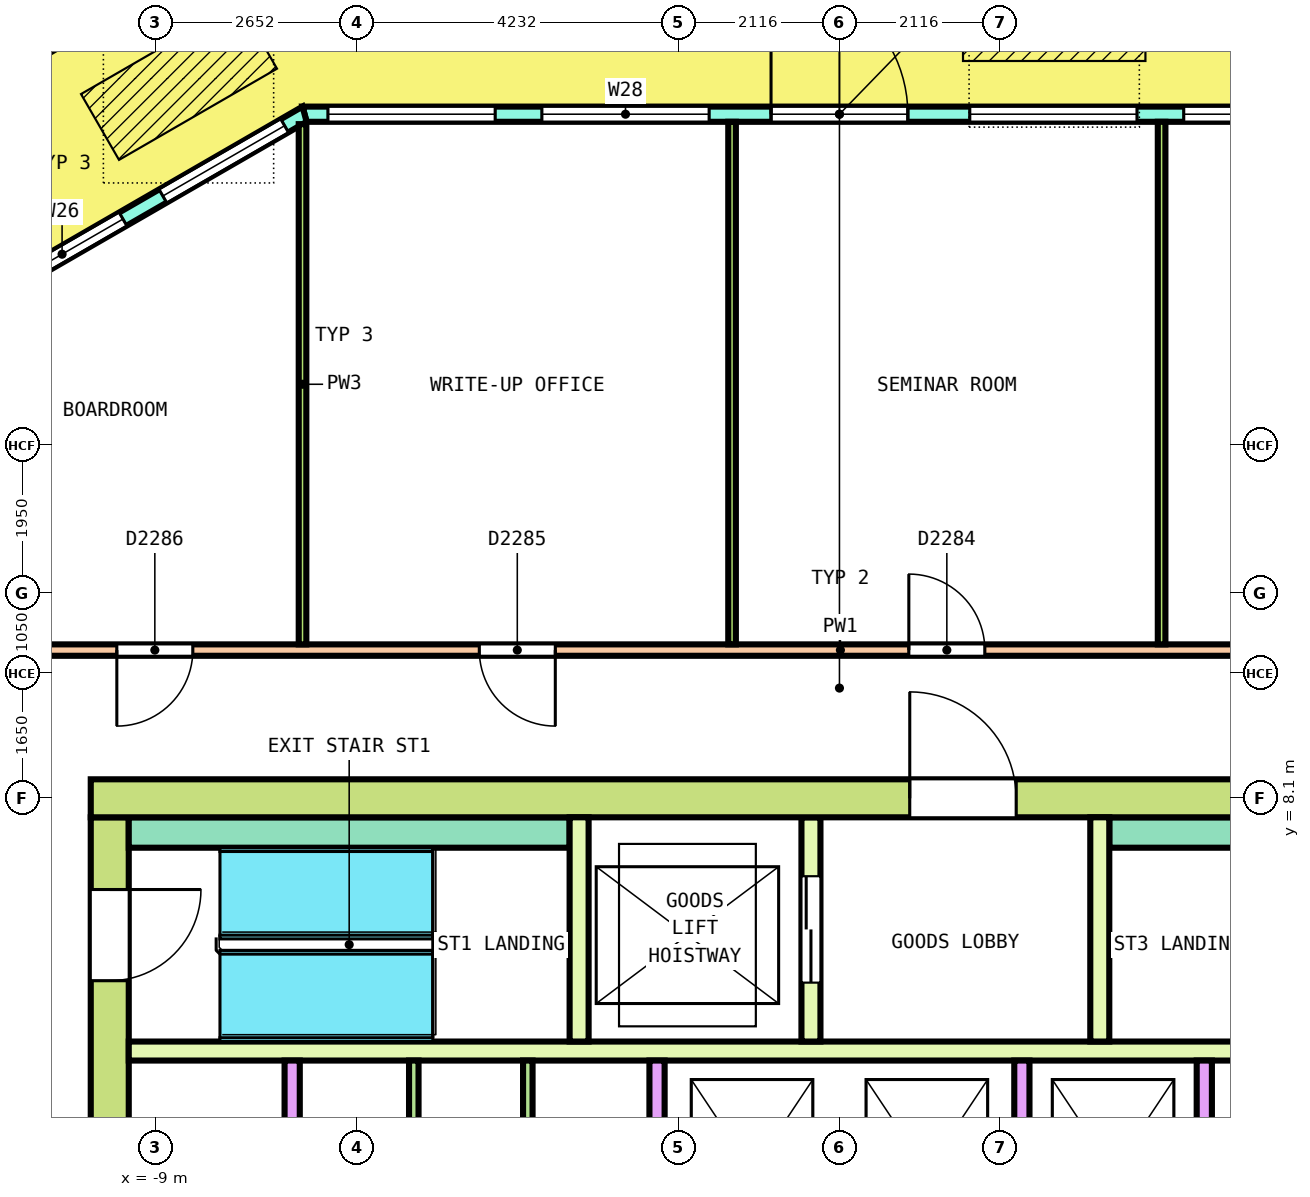
"""IFC4 building model, lengths in metres.
Left out: names, types, materials, properties, quantities, classifications, styles, units other than length and angle.
Written with IfcOpenShell. Run it as: python <this file> out.ifc"""

import sys

from ifc_helpers import new_model, si_unit, direction, frame, frame_2d, origin, origin_2d, place, context, subcontext, project, spatial, polyline, rectangle, outline, extrude, element, fill, save


model = new_model("IFC4")
c1 = context("Model", 3, precision=1e-05, world=origin(), true_north=direction((0.0, 1.0)))
c2 = subcontext(c1, "Body", "Model", "MODEL_VIEW")
j1 = project(units=[si_unit("LENGTHUNIT", "METRE"), si_unit("PLANEANGLEUNIT", "RADIAN")], contexts=[c1])
p1 = place(None, origin())
s1 = spatial("IfcSite", under=j1, at=p1, CompositionType="ELEMENT")
p2 = place(p1, origin())
s2 = spatial("IfcBuilding", under=s1, at=p2, CompositionType="ELEMENT")
p3 = place(p2, frame((0.0, 0.0, 308.6)))
s3 = spatial("IfcBuildingStorey", under=s2, at=p3, CompositionType="ELEMENT", Elevation=308.6)
p4 = place(p3, frame((-10.564, 18.297, 0.0), z_axis=(-0.036297136169, 0.0, 0.99934104184), x_axis=(-0.865312543657, -0.500246354177, -0.031429077673)))
e1 = element("IfcColumn", 1, at=p4, inside=s3, PredefinedType="COLUMN", context=c2, shape_type="SweptSolid", body=[
    extrude(rectangle(XDim=0.85, YDim=0.85, at=origin_2d()), origin(), (0.0, 0.0, 1.0), 3.652),
])
p5 = place(p3, frame((7.037, 17.1, 0.0), z_axis=(0.0, 0.0, 1.0), x_axis=(-1.0, 0.0, 0.0)))
e2 = element("IfcWall", 2, at=p5, inside=s3, PredefinedType="SOLIDWALL", context=c2, shape_type="SweptSolid", body=[
    extrude(outline(polyline([(-0.027, -0.1), (0.982, -0.1), (1.991, -0.1), (3.0, -0.1), (4.01, -0.1), (5.019, -0.1), (6.028, -0.1), (7.037, -0.1), (8.046, -0.1), (9.055, -0.1), (10.064, -0.1), (11.074, -0.1), (12.083, -0.1), (13.092, -0.1), (14.101, -0.1), (14.047, 0.1), (13.046, 0.1), (12.044, 0.1), (11.043, 0.1), (10.042, 0.1), (9.04, 0.1), (8.039, 0.1), (7.037, 0.1), (6.036, 0.1), (5.034, 0.1), (4.033, 0.1), (3.031, 0.1), (2.03, 0.1), (1.028, 0.1), (0.027, 0.1), (-0.027, -0.1)])), origin(), (0.0, 0.0, 1.0), 3.7),
])
p6 = place(p5, frame((0.307, 0.0, 0.1)))
e3 = element("IfcOpeningElement", 3, at=p6, cuts=e2, PredefinedType="OPENING", context=c2, shape_type="SweptSolid", body=[
    extrude(rectangle(XDim=2.2, YDim=2.9, at=frame_2d((1.1, 1.45))), frame((0.0, 0.11, 0.0), z_axis=(0.0, -1.0, 0.0), x_axis=(1.0, 0.0, 0.0)), (0.0, 0.0, 1.0), 0.22),
])
p7 = place(p5, frame((3.122, 0.0, 0.1)))
e4 = element("IfcOpeningElement", 4, at=p7, cuts=e2, PredefinedType="OPENING", context=c2, shape_type="SweptSolid", body=[
    extrude(rectangle(XDim=2.2, YDim=2.9, at=frame_2d((1.1, 1.45))), frame((0.0, 0.11, 0.0), z_axis=(0.0, -1.0, 0.0), x_axis=(1.0, 0.0, 0.0)), (0.0, 0.0, 1.0), 0.22),
])
p8 = place(p5, frame((6.137, 0.0, 0.0)))
e5 = element("IfcOpeningElement", 5, at=p8, cuts=e2, PredefinedType="OPENING", context=c2, shape_type="SweptSolid", body=[
    extrude(rectangle(XDim=1.8, YDim=2.4, at=frame_2d((0.9, 1.2))), frame((0.0, 0.11, 0.0), z_axis=(0.0, -1.0, 0.0), x_axis=(1.0, 0.0, 0.0)), (0.0, 0.0, 1.0), 0.22),
])
p9 = place(p5, frame((6.137, 0.0, 2.55)))
e6 = element("IfcOpeningElement", 6, at=p9, cuts=e2, PredefinedType="OPENING", context=c2, shape_type="SweptSolid", body=[
    extrude(rectangle(XDim=1.8, YDim=0.45, at=frame_2d((0.9, 0.225))), frame((0.0, 0.11, 0.0), z_axis=(0.0, -1.0, 0.0), x_axis=(1.0, 0.0, 0.0)), (0.0, 0.0, 1.0), 0.22),
])
p10 = place(p5, frame((8.752, 0.0, 0.1)))
e7 = element("IfcOpeningElement", 7, at=p10, cuts=e2, PredefinedType="OPENING", context=c2, shape_type="SweptSolid", body=[
    extrude(rectangle(XDim=2.2, YDim=2.9, at=frame_2d((1.1, 1.45))), frame((0.0, 0.11, 0.0), z_axis=(0.0, -1.0, 0.0), x_axis=(1.0, 0.0, 0.0)), (0.0, 0.0, 1.0), 0.22),
])
p11 = place(p5, frame((11.566, 0.0, 0.1)))
e8 = element("IfcOpeningElement", 8, at=p11, cuts=e2, PredefinedType="OPENING", context=c2, shape_type="SweptSolid", body=[
    extrude(rectangle(XDim=2.2, YDim=2.9, at=frame_2d((1.1, 1.45))), frame((0.0, 0.11, 0.0), z_axis=(0.0, -1.0, 0.0), x_axis=(1.0, 0.0, 0.0)), (0.0, 0.0, 1.0), 0.22),
])
p12 = place(p3, frame((-7.037, 17.1, 0.0), z_axis=(0.0, 0.0, 1.0), x_axis=(-0.86601671623, -0.500015046984, 0.0)))
e9 = element("IfcWall", 9, at=p12, inside=s3, PredefinedType="SOLIDWALL", context=c2, shape_type="SweptSolid", body=[
    extrude(outline(polyline([(-0.027, -0.1), (1.214, -0.1), (2.456, -0.1), (3.697, -0.1), (4.938, -0.1), (4.885, 0.1), (3.67, 0.1), (2.456, 0.1), (1.241, 0.1), (0.027, 0.1), (-0.027, -0.1)])), origin(), (0.0, 0.0, 1.0), 3.7),
])
p13 = place(p12, frame((0.303, 0.0, 0.1)))
e10 = element("IfcOpeningElement", 10, at=p13, cuts=e9, PredefinedType="OPENING", context=c2, shape_type="SweptSolid", body=[
    extrude(rectangle(XDim=1.85, YDim=2.9, at=frame_2d((0.925, 1.45))), frame((0.0, 0.11, 0.0), z_axis=(0.0, -1.0, 0.0), x_axis=(1.0, 0.0, 0.0)), (0.0, 0.0, 1.0), 0.22),
])
p14 = place(p12, frame((2.759, 0.0, 0.1)))
e11 = element("IfcOpeningElement", 11, at=p14, cuts=e9, PredefinedType="OPENING", context=c2, shape_type="SweptSolid", body=[
    extrude(rectangle(XDim=1.85, YDim=2.9, at=frame_2d((0.925, 1.45))), frame((0.0, 0.11, 0.0), z_axis=(0.0, -1.0, 0.0), x_axis=(1.0, 0.0, 0.0)), (0.0, 0.0, 1.0), 0.22),
])
p15 = place(p3, frame((-9.85, 8.1, 0.0), z_axis=(0.0, 0.0, 1.0), x_axis=(1.0, 0.0, 0.0)))
e12 = element("IfcWall", 12, at=p15, inside=s3, PredefinedType="SHEAR", context=c2, shape_type="SweptSolid", body=[
    extrude(rectangle(XDim=19.7, YDim=0.5, at=frame_2d((9.85, 0.0))), origin(), (0.0, 0.0, 1.0), 3.7),
])
p16 = place(p15, frame((10.775, 0.0, 0.0)))
e13 = element("IfcOpeningElement", 13, at=p16, cuts=e12, PredefinedType="OPENING", context=c2, shape_type="SweptSolid", body=[
    extrude(rectangle(XDim=1.4, YDim=2.1, at=frame_2d((0.7, 1.05))), frame((0.0, 0.26, 0.0), z_axis=(0.0, -1.0, 0.0), x_axis=(1.0, 0.0, 0.0)), (0.0, 0.0, 1.0), 0.52),
])
p17 = place(p3, frame((-9.6, -7.85, 0.0), z_axis=(0.0, 0.0, 1.0), x_axis=(0.0, 1.0, 0.0)))
e14 = element("IfcWall", 14, at=p17, inside=s3, PredefinedType="SHEAR", context=c2, shape_type="SweptSolid", body=[
    extrude(rectangle(XDim=15.7, YDim=0.5, at=frame_2d((7.85, 0.0))), origin(), (0.0, 0.0, 1.0), 3.7),
])
p18 = place(p17, frame((6.65, 0.0, 0.0)))
e15 = element("IfcOpeningElement", 15, at=p18, cuts=e14, PredefinedType="OPENING", context=c2, shape_type="SweptSolid", body=[
    extrude(rectangle(XDim=2.4, YDim=2.1, at=frame_2d((1.2, 1.05))), frame((0.0, 0.26, 0.0), z_axis=(0.0, -1.0, 0.0), x_axis=(1.0, 0.0, 0.0)), (0.0, 0.0, 1.0), 0.52),
])
p19 = place(p17, frame((13.55, 0.0, 0.0)))
e16 = element("IfcOpeningElement", 16, at=p19, cuts=e14, PredefinedType="OPENING", context=c2, shape_type="SweptSolid", body=[
    extrude(rectangle(XDim=1.2, YDim=2.1, at=frame_2d((0.6, 1.05))), frame((0.0, 0.26, 0.0), z_axis=(0.0, -1.0, 0.0), x_axis=(1.0, 0.0, 0.0)), (0.0, 0.0, 1.0), 0.52),
])
p20 = place(p17, frame((0.95, 0.0, 0.0)))
e17 = element("IfcOpeningElement", 17, at=p20, cuts=e14, PredefinedType="OPENING", context=c2, shape_type="SweptSolid", body=[
    extrude(rectangle(XDim=1.2, YDim=2.1, at=frame_2d((0.6, 1.05))), frame((0.0, 0.26, 0.0), z_axis=(0.0, -1.0, 0.0), x_axis=(1.0, 0.0, 0.0)), (0.0, 0.0, 1.0), 0.52),
])
p21 = place(p3, frame((-9.35, 4.775, 0.0), z_axis=(0.0, 0.0, 1.0), x_axis=(1.0, 0.0, 0.0)))
e18 = element("IfcWall", 18, at=p21, inside=s3, PredefinedType="SOLIDWALL", context=c2, shape_type="SweptSolid", body=[
    extrude(rectangle(XDim=18.7, YDim=0.25, at=frame_2d((9.35, 0.0))), origin(), (0.0, 0.0, 1.0), 3.7),
])
for number, where, z_axis, x_axis in (
    (19, (-7.2, 1.75, 0.0), (0.0, 0.0, 1.0), (0.0, 1.0, 0.0)),
    (20, (-2.4, 1.75, 0.0), (0.0, 0.0, 1.0), (0.0, 1.0, 0.0)),
    (21, (2.4, 1.75, 0.0), (0.0, 0.0, 1.0), (0.0, 1.0, 0.0)),
    (22, (4.8, 1.75, 0.0), (0.0, 0.0, 1.0), (0.0, 1.0, 0.0)),
):
    element("IfcWall", number, at=place(p3, frame(where, z_axis=z_axis, x_axis=x_axis)), inside=s3, PredefinedType="SOLIDWALL", context=c2, shape_type="SweptSolid", body=[
        extrude(rectangle(XDim=2.9, YDim=0.2, at=frame_2d((1.45, 0.0))), origin(), (0.0, 0.0, 1.0), 3.7),
    ])
for number, where, z_axis, x_axis in (
    (23, (-9.35, 7.65, 0.0), (0.0, 0.0, 1.0), (1.0, 0.0, 0.0)),
    (24, (3.55, 7.65, 0.0), (0.0, 0.0, 1.0), (1.0, 0.0, 0.0)),
):
    element("IfcWall", number, at=place(p3, frame(where, z_axis=z_axis, x_axis=x_axis)), inside=s3, PredefinedType="SOLIDWALL", context=c2, shape_type="SweptSolid", body=[
        extrude(rectangle(XDim=5.8, YDim=0.4, at=frame_2d((2.9, 0.0))), origin(), (0.0, 0.0, 1.0), 3.7),
    ])
p22 = place(p3, frame((-3.425, 4.9, 0.0), z_axis=(0.0, 0.0, 1.0), x_axis=(0.0, 1.0, 0.0)))
e25 = element("IfcWall", 25, at=p22, inside=s3, PredefinedType="SOLIDWALL", context=c2, shape_type="SweptSolid", body=[
    extrude(rectangle(XDim=2.95, YDim=0.25, at=frame_2d((1.475, 0.0))), origin(), (0.0, 0.0, 1.0), 3.7),
])
p23 = place(p3, frame((-0.375, 4.9, 0.0), z_axis=(0.0, 0.0, 1.0), x_axis=(0.0, 1.0, 0.0)))
e26 = element("IfcWall", 26, at=p23, inside=s3, PredefinedType="SOLIDWALL", context=c2, shape_type="SweptSolid", body=[
    extrude(rectangle(XDim=2.95, YDim=0.25, at=frame_2d((1.475, 0.0))), origin(), (0.0, 0.0, 1.0), 3.7),
])
p24 = place(p23, frame((0.775, 0.0, 0.0)))
e27 = element("IfcOpeningElement", 27, at=p24, cuts=e26, PredefinedType="OPENING", context=c2, shape_type="SweptSolid", body=[
    extrude(rectangle(XDim=1.4, YDim=2.1, at=frame_2d((0.7, 1.05))), frame((0.0, 0.135, 0.0), z_axis=(0.0, -1.0, 0.0), x_axis=(1.0, 0.0, 0.0)), (0.0, 0.0, 1.0), 0.27),
])
p25 = place(p3, frame((3.425, 4.9, 0.0), z_axis=(0.0, 0.0, 1.0), x_axis=(0.0, 1.0, 0.0)))
e28 = element("IfcWall", 28, at=p25, inside=s3, PredefinedType="SOLIDWALL", context=c2, shape_type="SweptSolid", body=[
    extrude(rectangle(XDim=2.95, YDim=0.25, at=frame_2d((1.475, 0.0))), origin(), (0.0, 0.0, 1.0), 3.7),
])
for number, where, z_axis, x_axis in (
    (29, (-5.6, 1.75, 0.0), (0.0, 0.0, 1.0), (0.0, 1.0, 0.0)),
    (30, (-4.1, 1.75, 0.0), (0.0, 0.0, 1.0), (0.0, 1.0, 0.0)),
):
    element("IfcWall", number, at=place(p3, frame(where, z_axis=z_axis, x_axis=x_axis)), inside=s3, PredefinedType="PARTITIONING", context=c2, shape_type="SweptSolid", body=[
        extrude(rectangle(XDim=2.9, YDim=0.125, at=frame_2d((1.45, 0.0))), origin(), (0.0, 0.0, 1.0), 3.7),
    ])
p26 = place(p3, frame((-10.875, 10.05, 0.0), z_axis=(0.0, 0.0, 1.0), x_axis=(1.0, 0.0, 0.0)))
e31 = element("IfcWall", 31, at=p26, inside=s3, PredefinedType="PARTITIONING", context=c2, shape_type="SweptSolid", body=[
    extrude(rectangle(XDim=21.775, YDim=0.15, at=frame_2d((10.887, 0.0))), origin(), (0.0, 0.0, 1.0), 3.05),
])
p27 = place(p26, frame((17.147, 0.0, 0.0)))
e32 = element("IfcOpeningElement", 32, at=p27, cuts=e31, PredefinedType="OPENING", context=c2, shape_type="SweptSolid", body=[
    extrude(rectangle(XDim=1.2, YDim=2.1, at=frame_2d((0.6, 1.05))), frame((0.0, 0.085, 0.0), z_axis=(0.0, -1.0, 0.0), x_axis=(1.0, 0.0, 0.0)), (0.0, 0.0, 1.0), 0.17),
])
p28 = place(p26, frame((11.788, 0.0, 0.0)))
e33 = element("IfcOpeningElement", 33, at=p28, cuts=e31, PredefinedType="OPENING", context=c2, shape_type="SweptSolid", body=[
    extrude(rectangle(XDim=1.0, YDim=2.1, at=frame_2d((0.5, 1.05))), frame((0.0, 0.085, 0.0), z_axis=(0.0, -1.0, 0.0), x_axis=(1.0, 0.0, 0.0)), (0.0, 0.0, 1.0), 0.17),
])
p29 = place(p26, frame((6.137, 0.0, 0.0)))
e34 = element("IfcOpeningElement", 34, at=p29, cuts=e31, PredefinedType="OPENING", context=c2, shape_type="SweptSolid", body=[
    extrude(rectangle(XDim=1.0, YDim=2.1, at=frame_2d((0.5, 1.05))), frame((0.0, 0.085, 0.0), z_axis=(0.0, -1.0, 0.0), x_axis=(1.0, 0.0, 0.0)), (0.0, 0.0, 1.0), 0.17),
])
p30 = place(p26, frame((1.368, 0.0, 0.0)))
e35 = element("IfcOpeningElement", 35, at=p30, cuts=e31, PredefinedType="OPENING", context=c2, shape_type="SweptSolid", body=[
    extrude(rectangle(XDim=1.0, YDim=2.1, at=frame_2d((0.5, 1.05))), frame((0.0, 0.085, 0.0), z_axis=(0.0, -1.0, 0.0), x_axis=(1.0, 0.0, 0.0)), (0.0, 0.0, 1.0), 0.17),
])
for number, where, z_axis, x_axis in (
    (36, (4.238, 10.125, 0.0), (0.0, 0.0, 1.0), (0.0, 1.0, 0.0)),
    (37, (-1.413, 10.125, 0.0), (0.0, 0.0, 1.0), (0.0, 1.0, 0.0)),
):
    element("IfcWall", number, at=place(p3, frame(where, z_axis=z_axis, x_axis=x_axis)), inside=s3, PredefinedType="PARTITIONING", context=c2, shape_type="SweptSolid", body=[
        extrude(rectangle(XDim=6.875, YDim=0.1, at=frame_2d((3.438, 0.0))), origin(), (0.0, 0.0, 1.0), 3.05),
    ])
p31 = place(p3, frame((-7.064, 10.125, 0.0), z_axis=(0.0, 0.0, 1.0), x_axis=(0.0, 1.0, 0.0)))
e38 = element("IfcWall", 38, at=p31, inside=s3, PredefinedType="PARTITIONING", context=c2, shape_type="SweptSolid", body=[
    extrude(rectangle(XDim=6.844, YDim=0.1, at=frame_2d((3.422, 0.0))), origin(), (0.0, 0.0, 1.0), 3.05),
])
p32 = place(p6, origin())
e39 = element("IfcWindow", 39, at=p32, inside=s3, PartitioningType="SINGLE_PANEL", PredefinedType="WINDOW", context=c2, shape_type="SweptSolid", body=[
    extrude(rectangle(XDim=2.2, YDim=2.9, at=frame_2d((1.1, 1.45))), frame((0.0, 0.03, 0.0), z_axis=(0.0, -1.0, 0.0), x_axis=(1.0, 0.0, 0.0)), (0.0, 0.0, 1.0), 0.06),
])
fill(e3, e39)
p33 = place(p7, origin())
e40 = element("IfcWindow", 40, at=p33, inside=s3, PartitioningType="SINGLE_PANEL", PredefinedType="WINDOW", context=c2, shape_type="SweptSolid", body=[
    extrude(rectangle(XDim=2.2, YDim=2.9, at=frame_2d((1.1, 1.45))), frame((0.0, 0.03, 0.0), z_axis=(0.0, -1.0, 0.0), x_axis=(1.0, 0.0, 0.0)), (0.0, 0.0, 1.0), 0.06),
])
fill(e4, e40)
p34 = place(p8, origin())
e41 = element("IfcDoor", 41, at=p34, inside=s3, OperationType="DOUBLE_DOOR_SINGLE_SWING", PredefinedType="DOOR", context=c2, shape_type="SweptSolid", body=[
    extrude(rectangle(XDim=1.8, YDim=2.4, at=frame_2d((0.9, 1.2))), frame((0.0, 0.025, 0.0), z_axis=(0.0, -1.0, 0.0), x_axis=(1.0, 0.0, 0.0)), (0.0, 0.0, 1.0), 0.05),
])
fill(e5, e41)
p35 = place(p9, origin())
e42 = element("IfcWindow", 42, at=p35, inside=s3, PartitioningType="SINGLE_PANEL", PredefinedType="WINDOW", context=c2, shape_type="SweptSolid", body=[
    extrude(rectangle(XDim=1.8, YDim=0.45, at=frame_2d((0.9, 0.225))), frame((0.0, 0.03, 0.0), z_axis=(0.0, -1.0, 0.0), x_axis=(1.0, 0.0, 0.0)), (0.0, 0.0, 1.0), 0.06),
])
fill(e6, e42)
p36 = place(p10, origin())
e43 = element("IfcWindow", 43, at=p36, inside=s3, PartitioningType="SINGLE_PANEL", PredefinedType="WINDOW", context=c2, shape_type="SweptSolid", body=[
    extrude(rectangle(XDim=2.2, YDim=2.9, at=frame_2d((1.1, 1.45))), frame((0.0, 0.03, 0.0), z_axis=(0.0, -1.0, 0.0), x_axis=(1.0, 0.0, 0.0)), (0.0, 0.0, 1.0), 0.06),
])
fill(e7, e43)
p37 = place(p11, origin())
e44 = element("IfcWindow", 44, at=p37, inside=s3, PartitioningType="SINGLE_PANEL", PredefinedType="WINDOW", context=c2, shape_type="SweptSolid", body=[
    extrude(rectangle(XDim=2.2, YDim=2.9, at=frame_2d((1.1, 1.45))), frame((0.0, 0.03, 0.0), z_axis=(0.0, -1.0, 0.0), x_axis=(1.0, 0.0, 0.0)), (0.0, 0.0, 1.0), 0.06),
])
fill(e8, e44)
p38 = place(p13, origin())
e45 = element("IfcWindow", 45, at=p38, inside=s3, PartitioningType="SINGLE_PANEL", PredefinedType="WINDOW", context=c2, shape_type="SweptSolid", body=[
    extrude(rectangle(XDim=1.85, YDim=2.9, at=frame_2d((0.925, 1.45))), frame((0.0, 0.03, 0.0), z_axis=(0.0, -1.0, 0.0), x_axis=(1.0, 0.0, 0.0)), (0.0, 0.0, 1.0), 0.06),
])
fill(e10, e45)
p39 = place(p14, origin())
e46 = element("IfcWindow", 46, at=p39, inside=s3, PartitioningType="SINGLE_PANEL", PredefinedType="WINDOW", context=c2, shape_type="SweptSolid", body=[
    extrude(rectangle(XDim=1.85, YDim=2.9, at=frame_2d((0.925, 1.45))), frame((0.0, 0.03, 0.0), z_axis=(0.0, -1.0, 0.0), x_axis=(1.0, 0.0, 0.0)), (0.0, 0.0, 1.0), 0.06),
])
fill(e11, e46)
p40 = place(p24, origin())
e47 = element("IfcDoor", 47, at=p40, inside=s3, OperationType="DOUBLE_DOOR_SLIDING", PredefinedType="DOOR", context=c2, shape_type="SweptSolid", body=[
    extrude(rectangle(XDim=1.4, YDim=2.1, at=frame_2d((0.7, 1.05))), frame((0.0, 0.075, 0.0), z_axis=(0.0, -1.0, 0.0), x_axis=(1.0, 0.0, 0.0)), (0.0, 0.0, 1.0), 0.15),
])
fill(e27, e47)
p41 = place(p19, origin())
e48 = element("IfcDoor", 48, at=p41, inside=s3, OperationType="SINGLE_SWING_LEFT", PredefinedType="DOOR", context=c2, shape_type="SweptSolid", body=[
    extrude(rectangle(XDim=1.2, YDim=2.1, at=frame_2d((0.6, 1.05))), frame((0.0, 0.2, 0.0), z_axis=(0.0, -1.0, 0.0), x_axis=(1.0, 0.0, 0.0)), (0.0, 0.0, 1.0), 0.4),
])
fill(e16, e48)
p42 = place(p16, origin())
e49 = element("IfcDoor", 49, at=p42, inside=s3, OperationType="DOUBLE_DOOR_SINGLE_SWING", PredefinedType="DOOR", context=c2, shape_type="SweptSolid", body=[
    extrude(rectangle(XDim=1.4, YDim=2.1, at=frame_2d((0.7, 1.05))), frame((0.0, 0.2, 0.0), z_axis=(0.0, -1.0, 0.0), x_axis=(1.0, 0.0, 0.0)), (0.0, 0.0, 1.0), 0.4),
])
fill(e13, e49)
p43 = place(p28, origin())
e50 = element("IfcDoor", 50, at=p43, inside=s3, OperationType="SINGLE_SWING_RIGHT", PredefinedType="DOOR", context=c2, shape_type="SweptSolid", body=[
    extrude(rectangle(XDim=1.0, YDim=2.1, at=frame_2d((0.5, 1.05))), frame((0.0, 0.025, 0.0), z_axis=(0.0, -1.0, 0.0), x_axis=(1.0, 0.0, 0.0)), (0.0, 0.0, 1.0), 0.05),
])
fill(e33, e50)
p44 = place(p29, origin())
e51 = element("IfcDoor", 51, at=p44, inside=s3, OperationType="SINGLE_SWING_LEFT", PredefinedType="DOOR", context=c2, shape_type="SweptSolid", body=[
    extrude(rectangle(XDim=1.0, YDim=2.1, at=frame_2d((0.5, 1.05))), frame((0.0, 0.025, 0.0), z_axis=(0.0, -1.0, 0.0), x_axis=(1.0, 0.0, 0.0)), (0.0, 0.0, 1.0), 0.05),
])
fill(e34, e51)
p45 = place(p30, origin())
e52 = element("IfcDoor", 52, at=p45, inside=s3, OperationType="SINGLE_SWING_LEFT", PredefinedType="DOOR", context=c2, shape_type="SweptSolid", body=[
    extrude(rectangle(XDim=1.0, YDim=2.1, at=frame_2d((0.5, 1.05))), frame((0.0, 0.025, 0.0), z_axis=(0.0, -1.0, 0.0), x_axis=(1.0, 0.0, 0.0)), (0.0, 0.0, 1.0), 0.05),
])
fill(e35, e52)
save(model, sys.argv[1])
